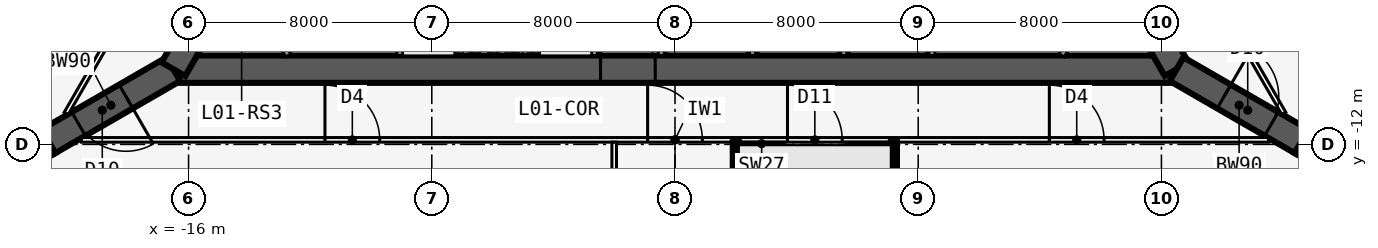
"""IFC4 building model, lengths in metres.
Left out: names, types, materials, properties, quantities, classifications, styles, units other than length and angle.
Written with IfcOpenShell. Run it as: python <this file> out.ifc"""

import sys

from ifc_helpers import new_model, si_unit, direction, frame, frame_2d, origin, place, context, subcontext, project, spatial, rectangle, extrude, element, fill, save


model = new_model("IFC4")
c1 = context("Model", 3, precision=1e-05, world=origin(), true_north=direction((0.0, 1.0)))
c2 = subcontext(c1, "Body", "Model", "MODEL_VIEW")
j1 = project(units=[si_unit("LENGTHUNIT", "METRE"), si_unit("PLANEANGLEUNIT", "RADIAN")], contexts=[c1])
p1 = place(None, origin())
s1 = spatial("IfcSite", under=j1, at=p1, CompositionType="ELEMENT")
p2 = place(p1, origin())
s2 = spatial("IfcBuilding", under=s1, at=p2, CompositionType="ELEMENT")
p3 = place(p2, frame((0.0, 0.0, 6.0)))
s3 = spatial("IfcBuildingStorey", under=s2, at=p3, CompositionType="ELEMENT", Elevation=6.0)
p4 = place(p3, frame((-16.5, -9.526, 0.0), z_axis=(0.0, 0.0, 1.0), x_axis=(1.0, 0.0, 0.0)))
e1 = element("IfcWall", 1, at=p4, inside=s3, PredefinedType="SHEAR", context=c2, shape_type="SweptSolid", body=[
    extrude(rectangle(XDim=33.0, YDim=0.9, at=frame_2d((16.5, 0.0))), origin(), (0.0, 0.0, 1.0), 5.0),
])
p5 = place(p4, frame((14.05, 0.0, 0.0)))
e2 = element("IfcOpeningElement", 2, at=p5, cuts=e1, PredefinedType="OPENING", context=c2, shape_type="SweptSolid", body=[
    extrude(rectangle(XDim=1.8, YDim=2.13, at=frame_2d((0.9, 1.065))), frame((0.0, 0.46, 0.0), z_axis=(0.0, -1.0, 0.0), x_axis=(1.0, 0.0, 0.0)), (0.0, 0.0, 1.0), 0.92),
])
p6 = place(p3, frame((-9.05, -5.951, 0.0), z_axis=(0.0, 0.0, 1.0), x_axis=(0.0, -1.0, 0.0)))
e3 = element("IfcWall", 3, at=p6, inside=s3, PredefinedType="SOLIDWALL", context=c2, shape_type="SweptSolid", body=[
    extrude(rectangle(XDim=3.125, YDim=0.2, at=frame_2d((1.562, 0.0))), origin(), (0.0, 0.0, 1.0), 4.75),
])
p7 = place(p3, frame((-2.65, -5.951, 0.0), z_axis=(0.0, 0.0, 1.0), x_axis=(0.0, -1.0, 0.0)))
e4 = element("IfcWall", 4, at=p7, inside=s3, PredefinedType="SOLIDWALL", context=c2, shape_type="SweptSolid", body=[
    extrude(rectangle(XDim=3.125, YDim=0.2, at=frame_2d((1.562, 0.0))), origin(), (0.0, 0.0, 1.0), 4.75),
])
p8 = place(p7, frame((1.525, 0.0, 0.0)))
e5 = element("IfcOpeningElement", 5, at=p8, cuts=e4, PredefinedType="OPENING", context=c2, shape_type="SweptSolid", body=[
    extrude(rectangle(XDim=1.0, YDim=2.13, at=frame_2d((0.5, 1.065))), frame((0.0, 0.11, 0.0), z_axis=(0.0, -1.0, 0.0), x_axis=(1.0, 0.0, 0.0)), (0.0, 0.0, 1.0), 0.22),
])
for number, where, z_axis, x_axis in (
    (6, (-0.45, -5.951, 0.0), (0.0, 0.0, 1.0), (0.0, -1.0, 0.0)),
    (7, (2.55, -5.951, 0.0), (0.0, 0.0, 1.0), (0.0, -1.0, 0.0)),
    (8, (5.55, -5.951, 0.0), (0.0, 0.0, 1.0), (0.0, -1.0, 0.0)),
    (9, (8.45, -5.951, 0.0), (0.0, 0.0, 1.0), (0.0, -1.0, 0.0)),
):
    element("IfcWall", number, at=place(p3, frame(where, z_axis=z_axis, x_axis=x_axis)), inside=s3, PredefinedType="SOLIDWALL", context=c2, shape_type="SweptSolid", body=[
        extrude(rectangle(XDim=3.125, YDim=0.2, at=frame_2d((1.562, 0.0))), origin(), (0.0, 0.0, 1.0), 4.75),
    ])
p9 = place(p3, frame((16.5, -9.526, 0.0), z_axis=(0.0, 0.0, 1.0), x_axis=(-0.499999749417, 0.866025548458, 0.0)))
e10 = element("IfcWall", 10, at=p9, inside=s3, PredefinedType="SHEAR", context=c2, shape_type="SweptSolid", body=[
    extrude(rectangle(XDim=33.0, YDim=0.9, at=frame_2d((16.5, 0.0))), origin(), (0.0, 0.0, 1.0), 5.0),
])
p10 = place(p9, frame((14.15, 0.0, 0.0)))
e11 = element("IfcOpeningElement", 11, at=p10, cuts=e10, PredefinedType="OPENING", context=c2, shape_type="SweptSolid", body=[
    extrude(rectangle(XDim=1.8, YDim=2.13, at=frame_2d((0.9, 1.065))), frame((0.0, 0.46, 0.0), z_axis=(0.0, -1.0, 0.0), x_axis=(1.0, 0.0, 0.0)), (0.0, 0.0, 1.0), 0.92),
])
p11 = place(p9, frame((12.6, 0.0, 0.0)))
e12 = element("IfcOpeningElement", 12, at=p11, cuts=e10, PredefinedType="OPENING", context=c2, shape_type="SweptSolid", body=[
    extrude(rectangle(XDim=1.0, YDim=2.13, at=frame_2d((0.5, 1.065))), frame((0.0, 0.46, 0.0), z_axis=(0.0, -1.0, 0.0), x_axis=(1.0, 0.0, 0.0)), (0.0, 0.0, 1.0), 0.92),
])
p12 = place(p3, frame((0.0, 19.052, 0.0), z_axis=(0.0, 0.0, 1.0), x_axis=(-0.499999749417, -0.866025548458, 0.0)))
e13 = element("IfcWall", 13, at=p12, inside=s3, PredefinedType="SHEAR", context=c2, shape_type="SweptSolid", body=[
    extrude(rectangle(XDim=33.0, YDim=0.9, at=frame_2d((16.5, 0.0))), origin(), (0.0, 0.0, 1.0), 5.0),
])
p13 = place(p12, frame((14.15, 0.0, 0.0)))
e14 = element("IfcOpeningElement", 14, at=p13, cuts=e13, PredefinedType="OPENING", context=c2, shape_type="SweptSolid", body=[
    extrude(rectangle(XDim=1.8, YDim=2.13, at=frame_2d((0.9, 1.065))), frame((0.0, 0.46, 0.0), z_axis=(0.0, -1.0, 0.0), x_axis=(1.0, 0.0, 0.0)), (0.0, 0.0, 1.0), 0.92),
])
p14 = place(p12, frame((12.6, 0.0, 0.0)))
e15 = element("IfcOpeningElement", 15, at=p14, cuts=e13, PredefinedType="OPENING", context=c2, shape_type="SweptSolid", body=[
    extrude(rectangle(XDim=1.0, YDim=2.13, at=frame_2d((0.5, 1.065))), frame((0.0, 0.46, 0.0), z_axis=(0.0, -1.0, 0.0), x_axis=(1.0, 0.0, 0.0)), (0.0, 0.0, 1.0), 0.92),
])
p15 = place(p3, frame((16.5, -9.526, 0.0), z_axis=(0.0, 0.0, 1.0), x_axis=(0.866031398331, -0.499989616998, 0.0)))
e16 = element("IfcWall", 16, at=p15, inside=s3, PredefinedType="SHEAR", context=c2, shape_type="SweptSolid", body=[
    extrude(rectangle(XDim=4.746, YDim=0.9, at=frame_2d((2.373, 0.0))), origin(), (0.0, 0.0, 1.0), 5.0),
])
p16 = place(p15, frame((1.8, 0.0, 0.0)))
e17 = element("IfcOpeningElement", 17, at=p16, cuts=e16, PredefinedType="OPENING", context=c2, shape_type="SweptSolid", body=[
    extrude(rectangle(XDim=1.8, YDim=2.13, at=frame_2d((0.9, 1.065))), frame((0.0, 0.46, 0.0), z_axis=(0.0, -1.0, 0.0), x_axis=(1.0, 0.0, 0.0)), (0.0, 0.0, 1.0), 0.92),
])
p17 = place(p3, frame((20.61, -11.899, 0.0), z_axis=(0.0, 0.0, 1.0), x_axis=(0.866009537788, -0.500027479704, 0.0)))
e18 = element("IfcWall", 18, at=p17, inside=s3, PredefinedType="SHEAR", context=c2, shape_type="SweptSolid", body=[
    extrude(rectangle(XDim=1.155, YDim=0.9, at=frame_2d((0.577, 0.0))), origin(), (0.0, 0.0, 1.0), 5.0),
])
p18 = place(p3, frame((-16.5, -9.526, 0.0), z_axis=(0.0, 0.0, 1.0), x_axis=(-0.866031398331, -0.499989616998, 0.0)))
e19 = element("IfcWall", 19, at=p18, inside=s3, PredefinedType="SHEAR", context=c2, shape_type="SweptSolid", body=[
    extrude(rectangle(XDim=4.746, YDim=0.9, at=frame_2d((2.373, 0.0))), origin(), (0.0, 0.0, 1.0), 5.0),
])
p19 = place(p18, frame((1.8, 0.0, 0.0)))
e20 = element("IfcOpeningElement", 20, at=p19, cuts=e19, PredefinedType="OPENING", context=c2, shape_type="SweptSolid", body=[
    extrude(rectangle(XDim=1.8, YDim=2.13, at=frame_2d((0.9, 1.065))), frame((0.0, 0.46, 0.0), z_axis=(0.0, -1.0, 0.0), x_axis=(1.0, 0.0, 0.0)), (0.0, 0.0, 1.0), 0.92),
])
p20 = place(p3, frame((-20.61, -11.899, 0.0), z_axis=(0.0, 0.0, 1.0), x_axis=(-0.866009537788, -0.500027479704, 0.0)))
e21 = element("IfcWall", 21, at=p20, inside=s3, PredefinedType="SHEAR", context=c2, shape_type="SweptSolid", body=[
    extrude(rectangle(XDim=1.155, YDim=0.9, at=frame_2d((0.577, 0.0))), origin(), (0.0, 0.0, 1.0), 5.0),
])
p21 = place(p3, frame((-19.527, -11.851, 0.0), z_axis=(0.0, 0.0, 1.0), x_axis=(1.0, 0.0, 0.0)))
e22 = element("IfcWall", 22, at=p21, inside=s3, PredefinedType="PARTITIONING", context=c2, shape_type="SweptSolid", body=[
    extrude(rectangle(XDim=39.054, YDim=0.15, at=frame_2d((19.527, 0.0))), origin(), (0.0, 0.0, 1.0), 3.808),
])
p22 = place(p21, frame((8.013, 0.0, 0.0)))
e23 = element("IfcOpeningElement", 23, at=p22, cuts=e22, PredefinedType="OPENING", context=c2, shape_type="SweptSolid", body=[
    extrude(rectangle(XDim=1.8, YDim=2.13, at=frame_2d((0.9, 1.065))), frame((0.0, 0.085, 0.0), z_axis=(0.0, -1.0, 0.0), x_axis=(1.0, 0.0, 0.0)), (0.0, 0.0, 1.0), 0.17),
])
p23 = place(p21, frame((18.627, 0.0, 0.0)))
e24 = element("IfcOpeningElement", 24, at=p23, cuts=e22, PredefinedType="OPENING", context=c2, shape_type="SweptSolid", body=[
    extrude(rectangle(XDim=1.8, YDim=2.13, at=frame_2d((0.9, 1.065))), frame((0.0, 0.085, 0.0), z_axis=(0.0, -1.0, 0.0), x_axis=(1.0, 0.0, 0.0)), (0.0, 0.0, 1.0), 0.17),
])
p24 = place(p21, frame((23.227, 0.0, 0.0)))
e25 = element("IfcOpeningElement", 25, at=p24, cuts=e22, PredefinedType="OPENING", context=c2, shape_type="SweptSolid", body=[
    extrude(rectangle(XDim=1.8, YDim=2.13, at=frame_2d((0.9, 1.065))), frame((0.0, 0.085, 0.0), z_axis=(0.0, -1.0, 0.0), x_axis=(1.0, 0.0, 0.0)), (0.0, 0.0, 1.0), 0.17),
])
p25 = place(p21, frame((31.841, 0.0, 0.0)))
e26 = element("IfcOpeningElement", 26, at=p25, cuts=e22, PredefinedType="OPENING", context=c2, shape_type="SweptSolid", body=[
    extrude(rectangle(XDim=1.8, YDim=2.13, at=frame_2d((0.9, 1.065))), frame((0.0, 0.085, 0.0), z_axis=(0.0, -1.0, 0.0), x_axis=(1.0, 0.0, 0.0)), (0.0, 0.0, 1.0), 0.17),
])
p26 = place(p3, frame((-2.0, -11.926, 0.0), z_axis=(0.0, 0.0, 1.0), x_axis=(0.0, -1.0, 0.0)))
e27 = element("IfcWall", 27, at=p26, inside=s3, PredefinedType="PARTITIONING", context=c2, shape_type="SweptSolid", body=[
    extrude(rectangle(XDim=17.236, YDim=0.15, at=frame_2d((8.618, 0.0))), origin(), (0.0, 0.0, 1.0), 4.75),
])
p27 = place(p3, frame((2.0, -11.926, 0.0), z_axis=(0.0, 0.0, 1.0), x_axis=(0.0, -1.0, 0.0)))
e28 = element("IfcWall", 28, at=p27, inside=s3, PredefinedType="SHEAR", context=c2, shape_type="SweptSolid", body=[
    extrude(rectangle(XDim=17.236, YDim=0.2, at=frame_2d((8.618, 0.0))), origin(), (0.0, 0.0, 1.0), 5.0),
])
p28 = place(p3, frame((7.2, -11.926, 0.0), z_axis=(0.0, 0.0, 1.0), x_axis=(0.0, -1.0, 0.0)))
e29 = element("IfcWall", 29, at=p28, inside=s3, PredefinedType="SHEAR", context=c2, shape_type="SweptSolid", body=[
    extrude(rectangle(XDim=17.167, YDim=0.2, at=frame_2d((8.583, 0.0))), origin(), (0.0, 0.0, 1.0), 5.0),
])
p29 = place(p3, frame((20.027, -10.985, 0.0), z_axis=(0.0, 0.0, 1.0), x_axis=(-0.500001677587, 0.866024435227, 0.0)))
e30 = element("IfcWall", 30, at=p29, inside=s3, PredefinedType="PARTITIONING", context=c2, shape_type="SweptSolid", body=[
    extrude(rectangle(XDim=39.054, YDim=0.15, at=frame_2d((19.527, 0.0))), origin(), (0.0, 0.0, 1.0), 3.808),
])
p30 = place(p29, frame((10.013, 0.0, 0.0)))
e31 = element("IfcOpeningElement", 31, at=p30, cuts=e30, PredefinedType="OPENING", context=c2, shape_type="SweptSolid", body=[
    extrude(rectangle(XDim=1.8, YDim=2.13, at=frame_2d((0.9, 1.065))), frame((0.0, 0.085, 0.0), z_axis=(0.0, -1.0, 0.0), x_axis=(1.0, 0.0, 0.0)), (0.0, 0.0, 1.0), 0.17),
])
p31 = place(p29, frame((23.227, 0.0, 0.0)))
e32 = element("IfcOpeningElement", 32, at=p31, cuts=e30, PredefinedType="OPENING", context=c2, shape_type="SweptSolid", body=[
    extrude(rectangle(XDim=1.8, YDim=2.13, at=frame_2d((0.9, 1.065))), frame((0.0, 0.085, 0.0), z_axis=(0.0, -1.0, 0.0), x_axis=(1.0, 0.0, 0.0)), (0.0, 0.0, 1.0), 0.17),
])
p32 = place(p29, frame((27.627, 0.0, 0.0)))
e33 = element("IfcOpeningElement", 33, at=p32, cuts=e30, PredefinedType="OPENING", context=c2, shape_type="SweptSolid", body=[
    extrude(rectangle(XDim=1.0, YDim=2.13, at=frame_2d((0.5, 1.065))), frame((0.0, 0.085, 0.0), z_axis=(0.0, -1.0, 0.0), x_axis=(1.0, 0.0, 0.0)), (0.0, 0.0, 1.0), 0.17),
])
p33 = place(p29, frame((30.527, 0.0, 0.0)))
e34 = element("IfcOpeningElement", 34, at=p33, cuts=e30, PredefinedType="OPENING", context=c2, shape_type="SweptSolid", body=[
    extrude(rectangle(XDim=1.0, YDim=2.13, at=frame_2d((0.5, 1.065))), frame((0.0, 0.085, 0.0), z_axis=(0.0, -1.0, 0.0), x_axis=(1.0, 0.0, 0.0)), (0.0, 0.0, 1.0), 0.17),
])
p34 = place(p29, frame((33.277, 0.0, 0.0)))
e35 = element("IfcOpeningElement", 35, at=p34, cuts=e30, PredefinedType="OPENING", context=c2, shape_type="SweptSolid", body=[
    extrude(rectangle(XDim=1.0, YDim=2.13, at=frame_2d((0.5, 1.065))), frame((0.0, 0.085, 0.0), z_axis=(0.0, -1.0, 0.0), x_axis=(1.0, 0.0, 0.0)), (0.0, 0.0, 1.0), 0.17),
])
p35 = place(p29, frame((36.39, 0.0, 0.0)))
e36 = element("IfcOpeningElement", 36, at=p35, cuts=e30, PredefinedType="OPENING", context=c2, shape_type="SweptSolid", body=[
    extrude(rectangle(XDim=1.0, YDim=2.13, at=frame_2d((0.5, 1.065))), frame((0.0, 0.085, 0.0), z_axis=(0.0, -1.0, 0.0), x_axis=(1.0, 0.0, 0.0)), (0.0, 0.0, 1.0), 0.17),
])
p36 = place(p3, frame((-0.5, 22.836, 0.0), z_axis=(0.0, 0.0, 1.0), x_axis=(-0.500001677587, -0.866024435227, 0.0)))
e37 = element("IfcWall", 37, at=p36, inside=s3, PredefinedType="PARTITIONING", context=c2, shape_type="SweptSolid", body=[
    extrude(rectangle(XDim=39.054, YDim=0.15, at=frame_2d((19.527, 0.0))), origin(), (0.0, 0.0, 1.0), 3.808),
])
p37 = place(p36, frame((10.013, 0.0, 0.0)))
e38 = element("IfcOpeningElement", 38, at=p37, cuts=e37, PredefinedType="OPENING", context=c2, shape_type="SweptSolid", body=[
    extrude(rectangle(XDim=1.8, YDim=2.13, at=frame_2d((0.9, 1.065))), frame((0.0, 0.085, 0.0), z_axis=(0.0, -1.0, 0.0), x_axis=(1.0, 0.0, 0.0)), (0.0, 0.0, 1.0), 0.17),
])
p38 = place(p36, frame((23.227, 0.0, 0.0)))
e39 = element("IfcOpeningElement", 39, at=p38, cuts=e37, PredefinedType="OPENING", context=c2, shape_type="SweptSolid", body=[
    extrude(rectangle(XDim=1.8, YDim=2.13, at=frame_2d((0.9, 1.065))), frame((0.0, 0.085, 0.0), z_axis=(0.0, -1.0, 0.0), x_axis=(1.0, 0.0, 0.0)), (0.0, 0.0, 1.0), 0.17),
])
p39 = place(p36, frame((27.627, 0.0, 0.0)))
e40 = element("IfcOpeningElement", 40, at=p39, cuts=e37, PredefinedType="OPENING", context=c2, shape_type="SweptSolid", body=[
    extrude(rectangle(XDim=1.0, YDim=2.13, at=frame_2d((0.5, 1.065))), frame((0.0, 0.085, 0.0), z_axis=(0.0, -1.0, 0.0), x_axis=(1.0, 0.0, 0.0)), (0.0, 0.0, 1.0), 0.17),
])
p40 = place(p36, frame((30.277, 0.0, 0.0)))
e41 = element("IfcOpeningElement", 41, at=p40, cuts=e37, PredefinedType="OPENING", context=c2, shape_type="SweptSolid", body=[
    extrude(rectangle(XDim=1.0, YDim=2.13, at=frame_2d((0.5, 1.065))), frame((0.0, 0.085, 0.0), z_axis=(0.0, -1.0, 0.0), x_axis=(1.0, 0.0, 0.0)), (0.0, 0.0, 1.0), 0.17),
])
p41 = place(p36, frame((34.89, 0.0, 0.0)))
e42 = element("IfcOpeningElement", 42, at=p41, cuts=e37, PredefinedType="OPENING", context=c2, shape_type="SweptSolid", body=[
    extrude(rectangle(XDim=1.0, YDim=2.13, at=frame_2d((0.5, 1.065))), frame((0.0, 0.085, 0.0), z_axis=(0.0, -1.0, 0.0), x_axis=(1.0, 0.0, 0.0)), (0.0, 0.0, 1.0), 0.17),
])
for number, where, z_axis, x_axis in (
    (43, (14.219, -6.476, 0.0), (0.0, 0.0, 1.0), (-0.5, -0.866, 0.0)),
    (44, (-12.719, -9.076, 0.0), (0.0, 0.0, 1.0), (-0.5, 0.866, 0.0)),
):
    element("IfcWall", number, at=place(p3, frame(where, z_axis=z_axis, x_axis=x_axis)), inside=s3, PredefinedType="SOLIDWALL", context=c2, shape_type="SweptSolid", body=[
        extrude(rectangle(XDim=3.002, YDim=0.2, at=frame_2d((1.501, 0.0))), origin(), (0.0, 0.0, 1.0), 4.75),
    ])
for number, where, z_axis, x_axis in (
    (45, (2.1, -11.976, 0.0), (0.0, 0.0, 1.0), (1.0, 0.0, 0.0)),
    (46, (5.6, -11.976, 0.0), (0.0, 0.0, 1.0), (1.0, 0.0, 0.0)),
):
    element("IfcWall", number, at=place(p3, frame(where, z_axis=z_axis, x_axis=x_axis)), inside=s3, PredefinedType="SOLIDWALL", context=c2, shape_type="SweptSolid", body=[
        extrude(rectangle(XDim=1.5, YDim=0.1, at=frame_2d((0.75, 0.0))), origin(), (0.0, 0.0, 1.0), 5.0),
    ])
p42 = place(p22, origin())
e47 = element("IfcDoor", 47, at=p42, inside=s3, OperationType="DOUBLE_DOOR_SINGLE_SWING", PredefinedType="DOOR", context=c2, shape_type="SweptSolid", body=[
    extrude(rectangle(XDim=1.8, YDim=2.13, at=frame_2d((0.9, 1.065))), frame((0.0, 0.025, 0.0), z_axis=(0.0, -1.0, 0.0), x_axis=(1.0, 0.0, 0.0)), (0.0, 0.0, 1.0), 0.05),
])
fill(e23, e47)
p43 = place(p23, origin())
e48 = element("IfcDoor", 48, at=p43, inside=s3, OperationType="DOUBLE_DOOR_SINGLE_SWING", PredefinedType="DOOR", context=c2, shape_type="SweptSolid", body=[
    extrude(rectangle(XDim=1.8, YDim=2.13, at=frame_2d((0.9, 1.065))), frame((0.0, 0.025, 0.0), z_axis=(0.0, -1.0, 0.0), x_axis=(1.0, 0.0, 0.0)), (0.0, 0.0, 1.0), 0.05),
])
fill(e24, e48)
p44 = place(p24, origin())
e49 = element("IfcDoor", 49, at=p44, inside=s3, OperationType="DOUBLE_DOOR_SINGLE_SWING", PredefinedType="DOOR", context=c2, shape_type="SweptSolid", body=[
    extrude(rectangle(XDim=1.8, YDim=2.13, at=frame_2d((0.9, 1.065))), frame((0.0, 0.025, 0.0), z_axis=(0.0, -1.0, 0.0), x_axis=(1.0, 0.0, 0.0)), (0.0, 0.0, 1.0), 0.05),
])
fill(e25, e49)
p45 = place(p25, origin())
e50 = element("IfcDoor", 50, at=p45, inside=s3, OperationType="DOUBLE_DOOR_SINGLE_SWING", PredefinedType="DOOR", context=c2, shape_type="SweptSolid", body=[
    extrude(rectangle(XDim=1.8, YDim=2.13, at=frame_2d((0.9, 1.065))), frame((0.0, 0.025, 0.0), z_axis=(0.0, -1.0, 0.0), x_axis=(1.0, 0.0, 0.0)), (0.0, 0.0, 1.0), 0.05),
])
fill(e26, e50)
p46 = place(p5, origin())
e51 = element("IfcDoor", 51, at=p46, inside=s3, OperationType="DOUBLE_DOOR_SINGLE_SWING", PredefinedType="DOOR", context=c2, shape_type="SweptSolid", body=[
    extrude(rectangle(XDim=1.8, YDim=2.13, at=frame_2d((0.9, 1.065))), frame((0.0, 0.025, 0.0), z_axis=(0.0, -1.0, 0.0), x_axis=(1.0, 0.0, 0.0)), (0.0, 0.0, 1.0), 0.05),
])
fill(e2, e51)
p47 = place(p16, origin())
e52 = element("IfcDoor", 52, at=p47, inside=s3, OperationType="DOUBLE_DOOR_DOUBLE_SWING", PredefinedType="DOOR", context=c2, shape_type="SweptSolid", body=[
    extrude(rectangle(XDim=1.8, YDim=2.13, at=frame_2d((0.9, 1.065))), frame((0.0, 0.025, 0.0), z_axis=(0.0, -1.0, 0.0), x_axis=(1.0, 0.0, 0.0)), (0.0, 0.0, 1.0), 0.05),
])
fill(e17, e52)
p48 = place(p19, origin())
e53 = element("IfcDoor", 53, at=p48, inside=s3, OperationType="DOUBLE_DOOR_DOUBLE_SWING", PredefinedType="DOOR", context=c2, shape_type="SweptSolid", body=[
    extrude(rectangle(XDim=1.8, YDim=2.13, at=frame_2d((0.9, 1.065))), frame((0.0, 0.025, 0.0), z_axis=(0.0, -1.0, 0.0), x_axis=(1.0, 0.0, 0.0)), (0.0, 0.0, 1.0), 0.05),
])
fill(e20, e53)
save(model, sys.argv[1])
